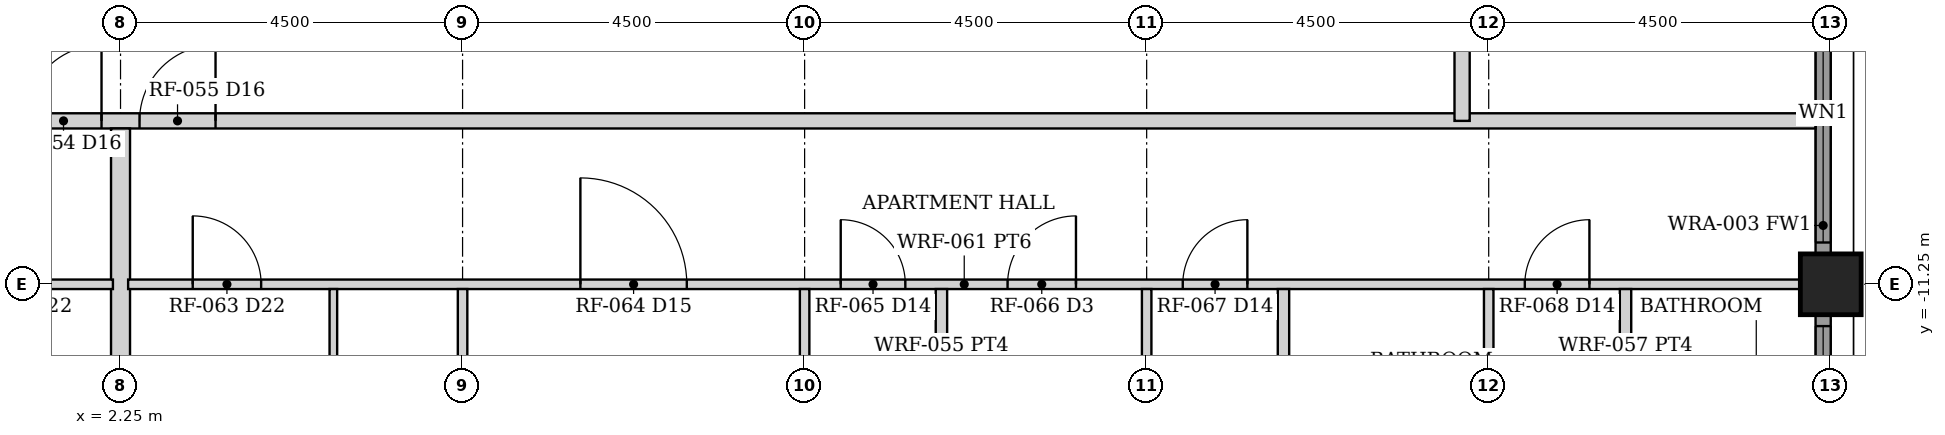
"""IFC4 building model, lengths in metres.
Left out: names, types, materials, properties, quantities, classifications, styles, units other than length and angle.
Written with IfcOpenShell. Run it as: python <this file> out.ifc"""

import sys

from ifc_helpers import new_model, si_unit, direction, frame, frame_2d, origin, origin_2d, place, context, subcontext, project, spatial, rectangle, hollow_rectangle, extrude, element, fill, save


model = new_model("IFC4")
c1 = context("Model", 3, precision=1e-05, world=origin(), true_north=direction((0.0, 1.0)))
c2 = subcontext(c1, "Body", "Model", "MODEL_VIEW")
j1 = project(units=[si_unit("LENGTHUNIT", "METRE"), si_unit("PLANEANGLEUNIT", "RADIAN")], contexts=[c1])
p1 = place(None, origin())
s1 = spatial("IfcSite", under=j1, at=p1, CompositionType="ELEMENT")
p2 = place(p1, origin())
s2 = spatial("IfcBuilding", under=s1, at=p2, CompositionType="ELEMENT")
p3 = place(p2, frame((0.0, 0.0, 79.0)))
s3 = spatial("IfcBuildingStorey", under=s2, at=p3, CompositionType="ELEMENT", Elevation=79.0)
p4 = place(p3, frame((24.75, -11.25, 0.0), z_axis=(0.0, 0.0, 1.0), x_axis=(1.0, 0.0, 0.0)))
e1 = element("IfcColumn", 1, at=p4, inside=s3, PredefinedType="COLUMN", context=c2, shape_type="SweptSolid", body=[
    extrude(hollow_rectangle(XDim=0.8, YDim=0.8, WallThickness=0.06, at=origin_2d()), origin(), (0.0, 0.0, 1.0), 3.5),
])
p5 = place(p3, frame((24.65, -15.345, 0.0), z_axis=(0.0, 0.0, 1.0), x_axis=(0.0, 1.0, 0.0)))
e2 = element("IfcWall", 2, at=p5, inside=s3, PredefinedType="SOLIDWALL", context=c2, shape_type="SweptSolid", body=[
    extrude(rectangle(XDim=3.69, YDim=0.2, at=frame_2d((1.845, 0.0))), origin(), (0.0, 0.0, 1.0), 2.379),
])
p6 = place(p5, frame((0.145, 0.0, 0.3)))
e3 = element("IfcOpeningElement", 3, at=p6, cuts=e2, PredefinedType="OPENING", context=c2, shape_type="SweptSolid", body=[
    extrude(rectangle(XDim=3.4, YDim=1.929, at=frame_2d((1.7, 0.964))), frame((0.0, 0.11, 0.0), z_axis=(0.0, -1.0, 0.0), x_axis=(1.0, 0.0, 0.0)), (0.0, 0.0, 1.0), 0.22),
])
p7 = place(p3, frame((24.65, -10.845, 0.0), z_axis=(0.0, 0.0, 1.0), x_axis=(0.0, 1.0, 0.0)))
e4 = element("IfcWall", 4, at=p7, inside=s3, PredefinedType="SOLIDWALL", context=c2, shape_type="SweptSolid", body=[
    extrude(rectangle(XDim=3.69, YDim=0.2, at=frame_2d((1.845, 0.0))), origin(), (0.0, 0.0, 1.0), 2.379),
])
p8 = place(p7, frame((0.145, 0.0, 0.3)))
e5 = element("IfcOpeningElement", 5, at=p8, cuts=e4, PredefinedType="OPENING", context=c2, shape_type="SweptSolid", body=[
    extrude(rectangle(XDim=3.4, YDim=1.929, at=frame_2d((1.7, 0.964))), frame((0.0, 0.11, 0.0), z_axis=(0.0, -1.0, 0.0), x_axis=(1.0, 0.0, 0.0)), (0.0, 0.0, 1.0), 0.22),
])
p9 = place(p3, frame((-24.55, -9.1, 0.0), z_axis=(0.0, 0.0, 1.0), x_axis=(1.0, 0.0, 0.0)))
e6 = element("IfcWall", 6, at=p9, inside=s3, PredefinedType="PARTITIONING", context=c2, shape_type="SweptSolid", body=[
    extrude(rectangle(XDim=49.1, YDim=0.2, at=frame_2d((24.55, 0.0))), origin(), (0.0, 0.0, 1.0), 2.373),
])
p10 = place(p9, frame((25.55, 0.0, 0.0)))
e7 = element("IfcOpeningElement", 7, at=p10, cuts=e6, PredefinedType="OPENING", context=c2, shape_type="SweptSolid", body=[
    extrude(rectangle(XDim=1.0, YDim=2.3, at=frame_2d((0.5, 1.15))), frame((0.0, 0.11, 0.0), z_axis=(0.0, -1.0, 0.0), x_axis=(1.0, 0.0, 0.0)), (0.0, 0.0, 1.0), 0.22),
])
p11 = place(p9, frame((27.05, 0.0, 0.0)))
e8 = element("IfcOpeningElement", 8, at=p11, cuts=e6, PredefinedType="OPENING", context=c2, shape_type="SweptSolid", body=[
    extrude(rectangle(XDim=1.0, YDim=2.3, at=frame_2d((0.5, 1.15))), frame((0.0, 0.11, 0.0), z_axis=(0.0, -1.0, 0.0), x_axis=(1.0, 0.0, 0.0)), (0.0, 0.0, 1.0), 0.22),
])
p12 = place(p3, frame((19.9, -9.1, 0.0), z_axis=(0.0, 0.0, 1.0), x_axis=(0.0, 1.0, 0.0)))
e9 = element("IfcWall", 9, at=p12, inside=s3, PredefinedType="PARTITIONING", context=c2, shape_type="SweptSolid", body=[
    extrude(rectangle(XDim=18.2, YDim=0.2, at=frame_2d((9.1, 0.0))), origin(), (0.0, 0.0, 1.0), 2.373),
])
p13 = place(p12, frame((6.35, 0.0, 0.0)))
e10 = element("IfcOpeningElement", 10, at=p13, cuts=e9, PredefinedType="OPENING", context=c2, shape_type="SweptSolid", body=[
    extrude(rectangle(XDim=1.0, YDim=2.3, at=frame_2d((0.5, 1.15))), frame((0.0, 0.11, 0.0), z_axis=(0.0, -1.0, 0.0), x_axis=(1.0, 0.0, 0.0)), (0.0, 0.0, 1.0), 0.22),
])
p14 = place(p3, frame((2.25, -24.35, 0.0), z_axis=(0.0, 0.0, 1.0), x_axis=(0.0, 1.0, 0.0)))
e11 = element("IfcWall", 11, at=p14, inside=s3, PredefinedType="PARTITIONING", context=c2, shape_type="SweptSolid", body=[
    extrude(rectangle(XDim=15.15, YDim=0.25, at=frame_2d((7.575, 0.0))), origin(), (0.0, 0.0, 1.0), 2.373),
])
p15 = place(p3, frame((-24.35, -11.25, 0.0), z_axis=(0.0, 0.0, 1.0), x_axis=(1.0, 0.0, 0.0)))
e12 = element("IfcWall", 12, at=p15, inside=s3, PredefinedType="PARTITIONING", context=c2, shape_type="SweptSolid", body=[
    extrude(rectangle(XDim=26.5, YDim=0.125, at=frame_2d((13.25, 0.0))), origin(), (0.0, 0.0, 1.0), 2.373),
])
p16 = place(p15, frame((24.75, 0.0, 0.0)))
e13 = element("IfcOpeningElement", 13, at=p16, cuts=e12, PredefinedType="OPENING", context=c2, shape_type="SweptSolid", body=[
    extrude(rectangle(XDim=0.9, YDim=2.1, at=frame_2d((0.45, 1.05))), frame((0.0, 0.073, 0.0), z_axis=(0.0, -1.0, 0.0), x_axis=(1.0, 0.0, 0.0)), (0.0, 0.0, 1.0), 0.145),
])
p17 = place(p15, frame((19.15, 0.0, 0.0)))
e14 = element("IfcOpeningElement", 14, at=p17, cuts=e12, PredefinedType="OPENING", context=c2, shape_type="SweptSolid", body=[
    extrude(rectangle(XDim=1.4, YDim=2.1, at=frame_2d((0.7, 1.05))), frame((0.0, 0.073, 0.0), z_axis=(0.0, -1.0, 0.0), x_axis=(1.0, 0.0, 0.0)), (0.0, 0.0, 1.0), 0.145),
])
p18 = place(p15, frame((16.275, 0.0, 0.0)))
e15 = element("IfcOpeningElement", 15, at=p18, cuts=e12, PredefinedType="OPENING", context=c2, shape_type="SweptSolid", body=[
    extrude(rectangle(XDim=0.85, YDim=2.1, at=frame_2d((0.425, 1.05))), frame((0.0, 0.073, 0.0), z_axis=(0.0, -1.0, 0.0), x_axis=(1.0, 0.0, 0.0)), (0.0, 0.0, 1.0), 0.145),
])
p19 = place(p15, frame((14.03, 0.0, 0.0)))
e16 = element("IfcOpeningElement", 16, at=p19, cuts=e12, PredefinedType="OPENING", context=c2, shape_type="SweptSolid", body=[
    extrude(rectangle(XDim=0.9, YDim=2.1, at=frame_2d((0.45, 1.05))), frame((0.0, 0.073, 0.0), z_axis=(0.0, -1.0, 0.0), x_axis=(1.0, 0.0, 0.0)), (0.0, 0.0, 1.0), 0.145),
])
p20 = place(p15, frame((11.775, 0.0, 0.0)))
e17 = element("IfcOpeningElement", 17, at=p20, cuts=e12, PredefinedType="OPENING", context=c2, shape_type="SweptSolid", body=[
    extrude(rectangle(XDim=0.85, YDim=2.1, at=frame_2d((0.425, 1.05))), frame((0.0, 0.073, 0.0), z_axis=(0.0, -1.0, 0.0), x_axis=(1.0, 0.0, 0.0)), (0.0, 0.0, 1.0), 0.145),
])
p21 = place(p15, frame((7.275, 0.0, 0.0)))
e18 = element("IfcOpeningElement", 18, at=p21, cuts=e12, PredefinedType="OPENING", context=c2, shape_type="SweptSolid", body=[
    extrude(rectangle(XDim=0.85, YDim=2.1, at=frame_2d((0.425, 1.05))), frame((0.0, 0.073, 0.0), z_axis=(0.0, -1.0, 0.0), x_axis=(1.0, 0.0, 0.0)), (0.0, 0.0, 1.0), 0.145),
])
p22 = place(p15, frame((2.775, 0.0, 0.0)))
e19 = element("IfcOpeningElement", 19, at=p22, cuts=e12, PredefinedType="OPENING", context=c2, shape_type="SweptSolid", body=[
    extrude(rectangle(XDim=0.85, YDim=2.1, at=frame_2d((0.425, 1.05))), frame((0.0, 0.073, 0.0), z_axis=(0.0, -1.0, 0.0), x_axis=(1.0, 0.0, 0.0)), (0.0, 0.0, 1.0), 0.145),
])
p23 = place(p3, frame((2.35, -11.25, 0.0), z_axis=(0.0, 0.0, 1.0), x_axis=(1.0, 0.0, 0.0)))
e20 = element("IfcWall", 20, at=p23, inside=s3, PredefinedType="PARTITIONING", context=c2, shape_type="SweptSolid", body=[
    extrude(rectangle(XDim=22.0, YDim=0.125, at=frame_2d((11.0, 0.0))), origin(), (0.0, 0.0, 1.0), 2.373),
])
p24 = place(p23, frame((0.85, 0.0, 0.0)))
e21 = element("IfcOpeningElement", 21, at=p24, cuts=e20, PredefinedType="OPENING", context=c2, shape_type="SweptSolid", body=[
    extrude(rectangle(XDim=0.9, YDim=2.1, at=frame_2d((0.45, 1.05))), frame((0.0, 0.073, 0.0), z_axis=(0.0, -1.0, 0.0), x_axis=(1.0, 0.0, 0.0)), (0.0, 0.0, 1.0), 0.145),
])
p25 = place(p23, frame((5.95, 0.0, 0.0)))
e22 = element("IfcOpeningElement", 22, at=p25, cuts=e20, PredefinedType="OPENING", context=c2, shape_type="SweptSolid", body=[
    extrude(rectangle(XDim=1.4, YDim=2.1, at=frame_2d((0.7, 1.05))), frame((0.0, 0.073, 0.0), z_axis=(0.0, -1.0, 0.0), x_axis=(1.0, 0.0, 0.0)), (0.0, 0.0, 1.0), 0.145),
])
p26 = place(p23, frame((9.375, 0.0, 0.0)))
e23 = element("IfcOpeningElement", 23, at=p26, cuts=e20, PredefinedType="OPENING", context=c2, shape_type="SweptSolid", body=[
    extrude(rectangle(XDim=0.85, YDim=2.1, at=frame_2d((0.425, 1.05))), frame((0.0, 0.073, 0.0), z_axis=(0.0, -1.0, 0.0), x_axis=(1.0, 0.0, 0.0)), (0.0, 0.0, 1.0), 0.145),
])
p27 = place(p23, frame((11.57, 0.0, 0.0)))
e24 = element("IfcOpeningElement", 24, at=p27, cuts=e20, PredefinedType="OPENING", context=c2, shape_type="SweptSolid", body=[
    extrude(rectangle(XDim=0.9, YDim=2.1, at=frame_2d((0.45, 1.05))), frame((0.0, 0.073, 0.0), z_axis=(0.0, -1.0, 0.0), x_axis=(1.0, 0.0, 0.0)), (0.0, 0.0, 1.0), 0.145),
])
p28 = place(p23, frame((13.875, 0.0, 0.0)))
e25 = element("IfcOpeningElement", 25, at=p28, cuts=e20, PredefinedType="OPENING", context=c2, shape_type="SweptSolid", body=[
    extrude(rectangle(XDim=0.85, YDim=2.1, at=frame_2d((0.425, 1.05))), frame((0.0, 0.073, 0.0), z_axis=(0.0, -1.0, 0.0), x_axis=(1.0, 0.0, 0.0)), (0.0, 0.0, 1.0), 0.145),
])
p29 = place(p23, frame((18.375, 0.0, 0.0)))
e26 = element("IfcOpeningElement", 26, at=p29, cuts=e20, PredefinedType="OPENING", context=c2, shape_type="SweptSolid", body=[
    extrude(rectangle(XDim=0.85, YDim=2.1, at=frame_2d((0.425, 1.05))), frame((0.0, 0.073, 0.0), z_axis=(0.0, -1.0, 0.0), x_axis=(1.0, 0.0, 0.0)), (0.0, 0.0, 1.0), 0.145),
])
p30 = place(p3, frame((5.05, -15.363, 0.0), z_axis=(0.0, 0.0, 1.0), x_axis=(0.0, 1.0, 0.0)))
e27 = element("IfcWall", 27, at=p30, inside=s3, PredefinedType="PARTITIONING", context=c2, shape_type="SweptSolid", body=[
    extrude(rectangle(XDim=4.05, YDim=0.1, at=frame_2d((2.025, 0.0))), origin(), (0.0, 0.0, 1.0), 2.373),
])
p31 = place(p3, frame((6.75, -24.35, 0.0), z_axis=(0.0, 0.0, 1.0), x_axis=(0.0, 1.0, 0.0)))
e28 = element("IfcWall", 28, at=p31, inside=s3, PredefinedType="PARTITIONING", context=c2, shape_type="SweptSolid", body=[
    extrude(rectangle(XDim=13.038, YDim=0.125, at=frame_2d((6.519, 0.0))), origin(), (0.0, 0.0, 1.0), 2.373),
])
p32 = place(p31, frame((3.844, 0.0, 0.0)))
e29 = element("IfcOpeningElement", 29, at=p32, cuts=e28, PredefinedType="OPENING", context=c2, shape_type="SweptSolid", body=[
    extrude(rectangle(XDim=1.4, YDim=2.1, at=frame_2d((0.7, 1.05))), frame((0.0, 0.073, 0.0), z_axis=(0.0, -1.0, 0.0), x_axis=(1.0, 0.0, 0.0)), (0.0, 0.0, 1.0), 0.145),
])
p33 = place(p3, frame((11.25, -24.35, 0.0), z_axis=(0.0, 0.0, 1.0), x_axis=(0.0, 1.0, 0.0)))
e30 = element("IfcWall", 30, at=p33, inside=s3, PredefinedType="PARTITIONING", context=c2, shape_type="SweptSolid", body=[
    extrude(rectangle(XDim=13.038, YDim=0.125, at=frame_2d((6.519, 0.0))), origin(), (0.0, 0.0, 1.0), 2.373),
])
p34 = place(p3, frame((13.05, -14.4, 0.0), z_axis=(0.0, 0.0, 1.0), x_axis=(0.0, 1.0, 0.0)))
e31 = element("IfcWall", 31, at=p34, inside=s3, PredefinedType="PARTITIONING", context=c2, shape_type="SweptSolid", body=[
    extrude(rectangle(XDim=3.087, YDim=0.15, at=frame_2d((1.544, 0.0))), origin(), (0.0, 0.0, 1.0), 2.373),
])
p35 = place(p34, frame((1.2, 0.0, 0.0)))
e32 = element("IfcOpeningElement", 32, at=p35, cuts=e31, PredefinedType="OPENING", context=c2, shape_type="SweptSolid", body=[
    extrude(rectangle(XDim=0.8, YDim=2.1, at=frame_2d((0.4, 1.05))), frame((0.0, 0.085, 0.0), z_axis=(0.0, -1.0, 0.0), x_axis=(1.0, 0.0, 0.0)), (0.0, 0.0, 1.0), 0.17),
])
p36 = place(p3, frame((15.75, -24.35, 0.0), z_axis=(0.0, 0.0, 1.0), x_axis=(0.0, 1.0, 0.0)))
e33 = element("IfcWall", 33, at=p36, inside=s3, PredefinedType="PARTITIONING", context=c2, shape_type="SweptSolid", body=[
    extrude(rectangle(XDim=13.038, YDim=0.125, at=frame_2d((6.519, 0.0))), origin(), (0.0, 0.0, 1.0), 2.373),
])
p37 = place(p3, frame((17.55, -14.4, 0.0), z_axis=(0.0, 0.0, 1.0), x_axis=(0.0, 1.0, 0.0)))
e34 = element("IfcWall", 34, at=p37, inside=s3, PredefinedType="PARTITIONING", context=c2, shape_type="SweptSolid", body=[
    extrude(rectangle(XDim=3.087, YDim=0.15, at=frame_2d((1.544, 0.0))), origin(), (0.0, 0.0, 1.0), 2.373),
])
p38 = place(p37, frame((1.2, 0.0, 0.0)))
e35 = element("IfcOpeningElement", 35, at=p38, cuts=e34, PredefinedType="OPENING", context=c2, shape_type="SweptSolid", body=[
    extrude(rectangle(XDim=0.8, YDim=2.1, at=frame_2d((0.4, 1.05))), frame((0.0, 0.085, 0.0), z_axis=(0.0, -1.0, 0.0), x_axis=(1.0, 0.0, 0.0)), (0.0, 0.0, 1.0), 0.17),
])
p39 = place(p3, frame((20.25, -24.35, 0.0), z_axis=(0.0, 0.0, 1.0), x_axis=(0.0, 1.0, 0.0)))
e36 = element("IfcWall", 36, at=p39, inside=s3, PredefinedType="PARTITIONING", context=c2, shape_type="SweptSolid", body=[
    extrude(rectangle(XDim=13.038, YDim=0.125, at=frame_2d((6.519, 0.0))), origin(), (0.0, 0.0, 1.0), 2.373),
])
p40 = place(p3, frame((22.05, -14.4, 0.0), z_axis=(0.0, 0.0, 1.0), x_axis=(0.0, 1.0, 0.0)))
e37 = element("IfcWall", 37, at=p40, inside=s3, PredefinedType="PARTITIONING", context=c2, shape_type="SweptSolid", body=[
    extrude(rectangle(XDim=3.087, YDim=0.15, at=frame_2d((1.544, 0.0))), origin(), (0.0, 0.0, 1.0), 2.373),
])
p41 = place(p40, frame((1.2, 0.0, 0.0)))
e38 = element("IfcOpeningElement", 38, at=p41, cuts=e37, PredefinedType="OPENING", context=c2, shape_type="SweptSolid", body=[
    extrude(rectangle(XDim=0.8, YDim=2.1, at=frame_2d((0.4, 1.05))), frame((0.0, 0.085, 0.0), z_axis=(0.0, -1.0, 0.0), x_axis=(1.0, 0.0, 0.0)), (0.0, 0.0, 1.0), 0.17),
])
p42 = place(p6, origin())
e39 = element("IfcWindow", 39, at=p42, inside=s3, PartitioningType="SINGLE_PANEL", PredefinedType="WINDOW", context=c2, shape_type="SweptSolid", body=[
    extrude(rectangle(XDim=3.4, YDim=1.929, at=frame_2d((1.7, 0.964))), frame((0.0, 0.03, 0.0), z_axis=(0.0, -1.0, 0.0), x_axis=(1.0, 0.0, 0.0)), (0.0, 0.0, 1.0), 0.06),
])
fill(e3, e39)
p43 = place(p8, origin())
e40 = element("IfcWindow", 40, at=p43, inside=s3, PartitioningType="SINGLE_PANEL", PredefinedType="WINDOW", context=c2, shape_type="SweptSolid", body=[
    extrude(rectangle(XDim=3.4, YDim=1.929, at=frame_2d((1.7, 0.964))), frame((0.0, 0.03, 0.0), z_axis=(0.0, -1.0, 0.0), x_axis=(1.0, 0.0, 0.0)), (0.0, 0.0, 1.0), 0.06),
])
fill(e5, e40)
p44 = place(p10, origin())
e41 = element("IfcDoor", 41, at=p44, inside=s3, OperationType="SINGLE_SWING_RIGHT", PredefinedType="DOOR", context=c2, shape_type="SweptSolid", body=[
    extrude(rectangle(XDim=1.0, YDim=2.3, at=frame_2d((0.5, 1.15))), frame((0.0, 0.025, 0.0), z_axis=(0.0, -1.0, 0.0), x_axis=(1.0, 0.0, 0.0)), (0.0, 0.0, 1.0), 0.05),
])
fill(e7, e41)
p45 = place(p11, origin())
e42 = element("IfcDoor", 42, at=p45, inside=s3, OperationType="SINGLE_SWING_RIGHT", PredefinedType="DOOR", context=c2, shape_type="SweptSolid", body=[
    extrude(rectangle(XDim=1.0, YDim=2.3, at=frame_2d((0.5, 1.15))), frame((0.0, 0.025, 0.0), z_axis=(0.0, -1.0, 0.0), x_axis=(1.0, 0.0, 0.0)), (0.0, 0.0, 1.0), 0.05),
])
fill(e8, e42)
p46 = place(p24, origin())
e43 = element("IfcDoor", 43, at=p46, inside=s3, OperationType="SINGLE_SWING_LEFT", PredefinedType="DOOR", context=c2, shape_type="SweptSolid", body=[
    extrude(rectangle(XDim=0.9, YDim=2.1, at=frame_2d((0.45, 1.05))), frame((0.0, 0.025, 0.0), z_axis=(0.0, -1.0, 0.0), x_axis=(1.0, 0.0, 0.0)), (0.0, 0.0, 1.0), 0.05),
])
fill(e21, e43)
p47 = place(p25, origin())
e44 = element("IfcDoor", 44, at=p47, inside=s3, OperationType="SINGLE_SWING_LEFT", PredefinedType="DOOR", context=c2, shape_type="SweptSolid", body=[
    extrude(rectangle(XDim=1.4, YDim=2.1, at=frame_2d((0.7, 1.05))), frame((0.0, 0.025, 0.0), z_axis=(0.0, -1.0, 0.0), x_axis=(1.0, 0.0, 0.0)), (0.0, 0.0, 1.0), 0.05),
])
fill(e22, e44)
p48 = place(p26, origin())
e45 = element("IfcDoor", 45, at=p48, inside=s3, OperationType="SINGLE_SWING_LEFT", PredefinedType="DOOR", context=c2, shape_type="SweptSolid", body=[
    extrude(rectangle(XDim=0.85, YDim=2.1, at=frame_2d((0.425, 1.05))), frame((0.0, 0.025, 0.0), z_axis=(0.0, -1.0, 0.0), x_axis=(1.0, 0.0, 0.0)), (0.0, 0.0, 1.0), 0.05),
])
fill(e23, e45)
p49 = place(p27, origin())
e46 = element("IfcDoor", 46, at=p49, inside=s3, OperationType="SINGLE_SWING_RIGHT", PredefinedType="DOOR", context=c2, shape_type="SweptSolid", body=[
    extrude(rectangle(XDim=0.9, YDim=2.1, at=frame_2d((0.45, 1.05))), frame((0.0, 0.025, 0.0), z_axis=(0.0, -1.0, 0.0), x_axis=(1.0, 0.0, 0.0)), (0.0, 0.0, 1.0), 0.05),
])
fill(e24, e46)
p50 = place(p28, origin())
e47 = element("IfcDoor", 47, at=p50, inside=s3, OperationType="SINGLE_SWING_RIGHT", PredefinedType="DOOR", context=c2, shape_type="SweptSolid", body=[
    extrude(rectangle(XDim=0.85, YDim=2.1, at=frame_2d((0.425, 1.05))), frame((0.0, 0.025, 0.0), z_axis=(0.0, -1.0, 0.0), x_axis=(1.0, 0.0, 0.0)), (0.0, 0.0, 1.0), 0.05),
])
fill(e25, e47)
p51 = place(p29, origin())
e48 = element("IfcDoor", 48, at=p51, inside=s3, OperationType="SINGLE_SWING_RIGHT", PredefinedType="DOOR", context=c2, shape_type="SweptSolid", body=[
    extrude(rectangle(XDim=0.85, YDim=2.1, at=frame_2d((0.425, 1.05))), frame((0.0, 0.025, 0.0), z_axis=(0.0, -1.0, 0.0), x_axis=(1.0, 0.0, 0.0)), (0.0, 0.0, 1.0), 0.05),
])
fill(e26, e48)
save(model, sys.argv[1])
